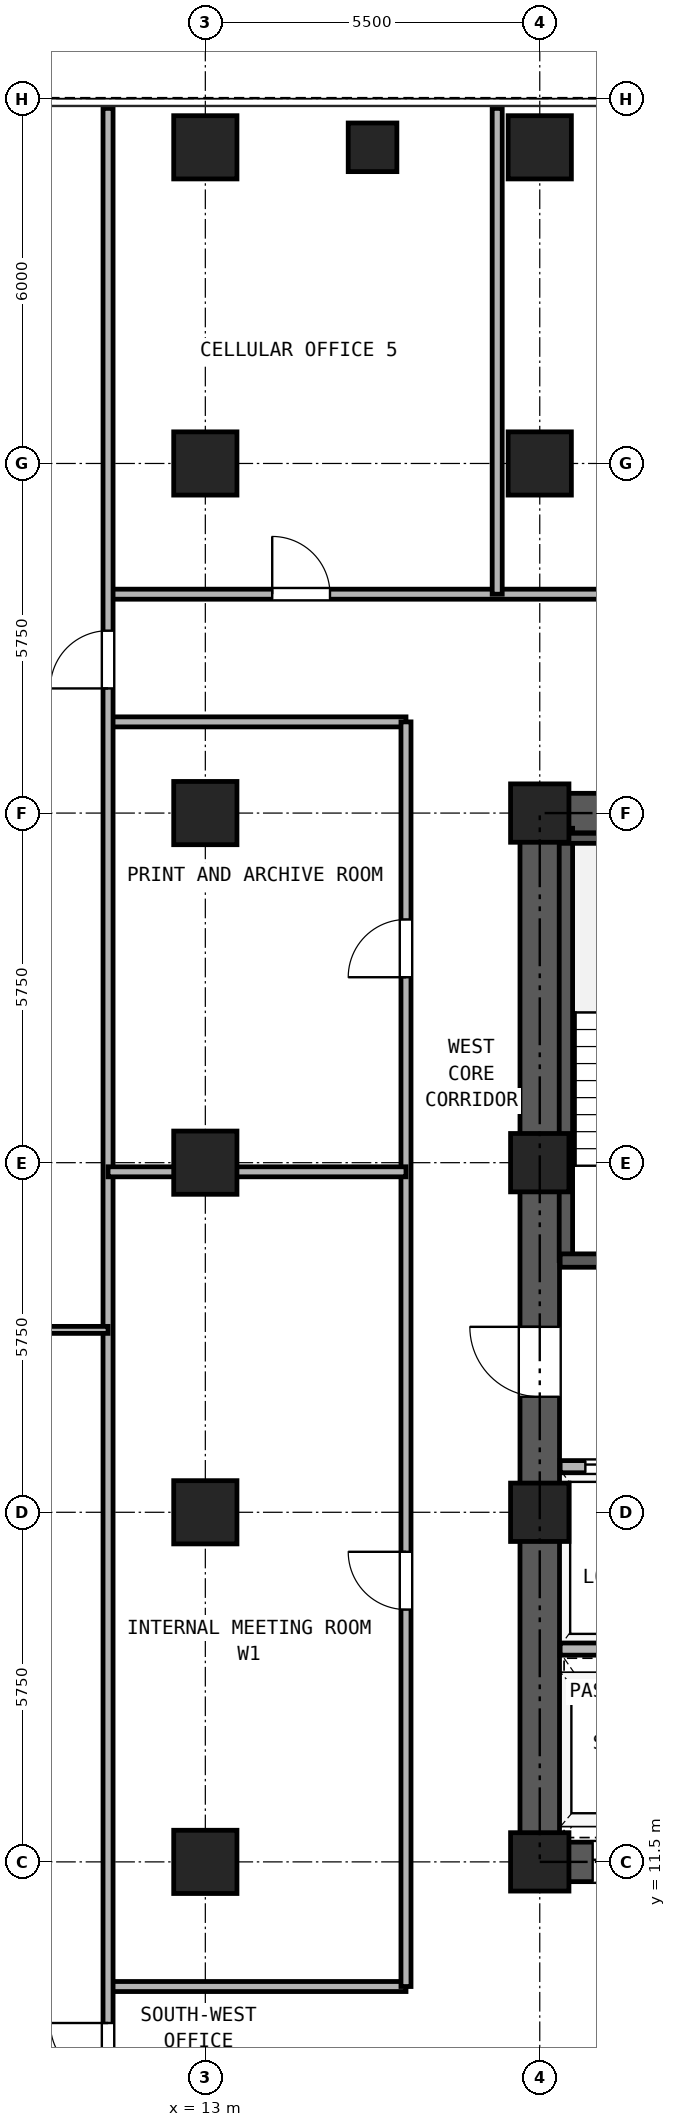
"""IFC4 building model, lengths in metres.
Left out: names, types, materials, properties, quantities, classifications, styles, units other than length and angle.
Written with IfcOpenShell. Run it as: python <this file> out.ifc"""

import sys

from ifc_helpers import new_model, si_unit, direction, frame, frame_2d, origin, origin_2d, place, context, subcontext, project, spatial, rectangle, hollow_rectangle, extrude, source, transform, mapped, element, fill, save


model = new_model("IFC4")
c1 = context("Model", 3, precision=1e-05, world=origin(), true_north=direction((0.0, 1.0)))
c2 = subcontext(c1, "Body", "Model", "MODEL_VIEW")
j1 = project(units=[si_unit("LENGTHUNIT", "METRE"), si_unit("PLANEANGLEUNIT", "RADIAN")], contexts=[c1])
p1 = place(None, origin())
s1 = spatial("IfcSite", under=j1, at=p1, CompositionType="ELEMENT")
p2 = place(p1, origin())
s2 = spatial("IfcBuilding", under=s1, at=p2, CompositionType="ELEMENT")
p3 = place(p2, frame((0.0, 0.0, 33.3)))
s3 = spatial("IfcBuildingStorey", under=s2, at=p3, CompositionType="ELEMENT", Elevation=33.3)
m1 = source(origin(), c2, "Body", "SweptSolid", [
    extrude(hollow_rectangle(XDim=1.04, YDim=1.04, WallThickness=0.065, at=origin_2d()), origin(), (0.0, 0.0, 1.0), 3.32),
])
for number, where, z_axis, x_axis in (
    (1, (13.0, 39.7, 0.0), (0.0, 0.0, 1.0), (1.0, 0.0, 0.0)),
    (2, (18.5, 39.7, 0.0), (0.0, 0.0, 1.0), (1.0, 0.0, 0.0)),
    (3, (13.0, 11.5, 0.0), (0.0, 0.0, 1.0), (1.0, 0.0, 0.0)),
    (4, (13.0, 17.25, 0.0), (0.0, 0.0, 1.0), (1.0, 0.0, 0.0)),
    (5, (13.0, 23.0, 0.0), (0.0, 0.0, 1.0), (1.0, 0.0, 0.0)),
    (6, (13.0, 28.75, 0.0), (0.0, 0.0, 1.0), (1.0, 0.0, 0.0)),
    (7, (13.0, 34.5, 0.0), (0.0, 0.0, 1.0), (1.0, 0.0, 0.0)),
):
    element("IfcColumn", number, at=place(p3, frame(where, z_axis=z_axis, x_axis=x_axis)), inside=s3, PredefinedType="COLUMN", context=c2, shape_type="MappedRepresentation", body=[
        mapped(m1, transform((0.0, 0.0, 0.0), x_axis=(1.0, 0.0, 0.0), y_axis=(0.0, 1.0, 0.0), z_axis=(0.0, 0.0, 1.0), scale=1.0)),
    ])
m2 = source(origin(), c2, "Body", "SweptSolid", [
    extrude(hollow_rectangle(XDim=0.96, YDim=0.96, WallThickness=0.06, at=origin_2d()), origin(), (0.0, 0.0, 1.0), 3.32),
])
for number, where, z_axis, x_axis in (
    (8, (18.5, 11.5, 0.0), (0.0, 0.0, 1.0), (1.0, 0.0, 0.0)),
    (9, (18.5, 17.25, 0.0), (0.0, 0.0, 1.0), (1.0, 0.0, 0.0)),
    (10, (18.5, 23.0, 0.0), (0.0, 0.0, 1.0), (1.0, 0.0, 0.0)),
    (11, (18.5, 28.75, 0.0), (0.0, 0.0, 1.0), (1.0, 0.0, 0.0)),
):
    element("IfcColumn", number, at=place(p3, frame(where, z_axis=z_axis, x_axis=x_axis)), inside=s3, PredefinedType="COLUMN", context=c2, shape_type="MappedRepresentation", body=[
        mapped(m2, transform((0.0, 0.0, 0.0), x_axis=(1.0, 0.0, 0.0), y_axis=(0.0, 1.0, 0.0), z_axis=(0.0, 0.0, 1.0), scale=1.0)),
    ])
p4 = place(p3, frame((18.5, 34.5, 0.0), z_axis=(0.0, 0.0, 1.0), x_axis=(1.0, 0.0, 0.0)))
e12 = element("IfcColumn", 12, at=p4, inside=s3, PredefinedType="COLUMN", context=c2, shape_type="MappedRepresentation", body=[
    mapped(m1, transform((0.0, 0.0, 0.0), x_axis=(1.0, 0.0, 0.0), y_axis=(0.0, 1.0, 0.0), z_axis=(0.0, 0.0, 1.0), scale=1.0)),
])
m3 = source(origin(), c2, "Body", "SweptSolid", [
    extrude(hollow_rectangle(XDim=0.8, YDim=0.8, WallThickness=0.045, at=origin_2d()), origin(), (0.0, 0.0, 1.0), 3.32),
])
p5 = place(p3, frame((15.75, 39.7, 0.0), z_axis=(0.0, 0.0, 1.0), x_axis=(1.0, 0.0, 0.0)))
e13 = element("IfcColumn", 13, at=p5, inside=s3, PredefinedType="COLUMN", context=c2, shape_type="MappedRepresentation", body=[
    mapped(m3, transform((0.0, 0.0, 0.0), x_axis=(1.0, 0.0, 0.0), y_axis=(0.0, 1.0, 0.0), z_axis=(0.0, 0.0, 1.0), scale=1.0)),
])
p6 = place(p3, frame((18.175, 11.5, 0.0), z_axis=(0.0, 0.0, 1.0), x_axis=(1.0, 0.0, 0.0)))
e14 = element("IfcWall", 14, at=p6, inside=s3, PredefinedType="SHEAR", context=c2, shape_type="SweptSolid", body=[
    extrude(rectangle(XDim=10.65, YDim=0.65, at=frame_2d((5.325, 0.0))), origin(), (0.0, 0.0, 1.0), 3.32),
])
p7 = place(p6, frame((1.195, 0.0, 0.0)))
e15 = element("IfcOpeningElement", 15, at=p7, cuts=e14, PredefinedType="OPENING", context=c2, shape_type="SweptSolid", body=[
    extrude(rectangle(XDim=1.1, YDim=2.25, at=frame_2d((0.55, 1.125))), frame((0.0, 0.335, 0.0), z_axis=(0.0, -1.0, 0.0), x_axis=(1.0, 0.0, 0.0)), (0.0, 0.0, 1.0), 0.67),
])
p8 = place(p6, frame((3.495, 0.0, 0.0)))
e16 = element("IfcOpeningElement", 16, at=p8, cuts=e14, PredefinedType="OPENING", context=c2, shape_type="SweptSolid", body=[
    extrude(rectangle(XDim=1.1, YDim=2.25, at=frame_2d((0.55, 1.125))), frame((0.0, 0.335, 0.0), z_axis=(0.0, -1.0, 0.0), x_axis=(1.0, 0.0, 0.0)), (0.0, 0.0, 1.0), 0.67),
])
p9 = place(p6, frame((5.925, 0.0, 0.0)))
e17 = element("IfcOpeningElement", 17, at=p9, cuts=e14, PredefinedType="OPENING", context=c2, shape_type="SweptSolid", body=[
    extrude(rectangle(XDim=1.1, YDim=2.25, at=frame_2d((0.55, 1.125))), frame((0.0, 0.335, 0.0), z_axis=(0.0, -1.0, 0.0), x_axis=(1.0, 0.0, 0.0)), (0.0, 0.0, 1.0), 0.67),
])
p10 = place(p6, frame((8.325, 0.0, 0.0)))
e18 = element("IfcOpeningElement", 18, at=p10, cuts=e14, PredefinedType="OPENING", context=c2, shape_type="SweptSolid", body=[
    extrude(rectangle(XDim=1.1, YDim=2.25, at=frame_2d((0.55, 1.125))), frame((0.0, 0.335, 0.0), z_axis=(0.0, -1.0, 0.0), x_axis=(1.0, 0.0, 0.0)), (0.0, 0.0, 1.0), 0.67),
])
p11 = place(p3, frame((18.175, 28.75, 0.0), z_axis=(0.0, 0.0, 1.0), x_axis=(1.0, 0.0, 0.0)))
e19 = element("IfcWall", 19, at=p11, inside=s3, PredefinedType="SHEAR", context=c2, shape_type="SweptSolid", body=[
    extrude(rectangle(XDim=10.65, YDim=0.65, at=frame_2d((5.325, 0.0))), origin(), (0.0, 0.0, 1.0), 3.32),
])
p12 = place(p11, frame((4.205, 0.0, 0.0)))
e20 = element("IfcOpeningElement", 20, at=p12, cuts=e19, PredefinedType="OPENING", context=c2, shape_type="SweptSolid", body=[
    extrude(rectangle(XDim=0.9, YDim=2.05, at=frame_2d((0.45, 1.025))), frame((0.0, 0.335, 0.0), z_axis=(0.0, -1.0, 0.0), x_axis=(1.0, 0.0, 0.0)), (0.0, 0.0, 1.0), 0.67),
])
p13 = place(p11, frame((5.745, 0.0, 0.0)))
e21 = element("IfcOpeningElement", 21, at=p13, cuts=e19, PredefinedType="OPENING", context=c2, shape_type="SweptSolid", body=[
    extrude(rectangle(XDim=0.9, YDim=2.05, at=frame_2d((0.45, 1.025))), frame((0.0, 0.335, 0.0), z_axis=(0.0, -1.0, 0.0), x_axis=(1.0, 0.0, 0.0)), (0.0, 0.0, 1.0), 0.67),
])
p14 = place(p3, frame((18.5, 11.825, 0.0), z_axis=(0.0, 0.0, 1.0), x_axis=(0.0, 1.0, 0.0)))
e22 = element("IfcWall", 22, at=p14, inside=s3, PredefinedType="SHEAR", context=c2, shape_type="SweptSolid", body=[
    extrude(rectangle(XDim=16.6, YDim=0.65, at=frame_2d((8.3, 0.0))), origin(), (0.0, 0.0, 1.0), 3.32),
])
p15 = place(p14, frame((7.325, 0.0, 0.0)))
e23 = element("IfcOpeningElement", 23, at=p15, cuts=e22, PredefinedType="OPENING", context=c2, shape_type="SweptSolid", body=[
    extrude(rectangle(XDim=1.15, YDim=2.2, at=frame_2d((0.575, 1.1))), frame((0.0, 0.335, 0.0), z_axis=(0.0, -1.0, 0.0), x_axis=(1.0, 0.0, 0.0)), (0.0, 0.0, 1.0), 0.67),
])
p16 = place(p3, frame((18.93, 21.39, 0.0), z_axis=(0.0, 0.0, 1.0), x_axis=(0.0, 1.0, 0.0)))
e24 = element("IfcWall", 24, at=p16, inside=s3, PredefinedType="SOLIDWALL", context=c2, shape_type="SweptSolid", body=[
    extrude(rectangle(XDim=7.11, YDim=0.22, at=frame_2d((3.555, 0.0))), origin(), (0.0, 0.0, 1.0), 3.32),
])
p17 = place(p3, frame((18.835, 28.335, 0.0), z_axis=(0.0, 0.0, 1.0), x_axis=(1.0, 0.0, 0.0)))
e25 = element("IfcWall", 25, at=p17, inside=s3, PredefinedType="PARTITIONING", context=c2, shape_type="SweptSolid", body=[
    extrude(rectangle(XDim=3.275, YDim=0.165, at=frame_2d((1.638, 0.0))), origin(), (0.0, 0.0, 1.0), 3.32),
])
p18 = place(p3, frame((18.835, 21.39, 0.0), z_axis=(0.0, 0.0, 1.0), x_axis=(1.0, 0.0, 0.0)))
e26 = element("IfcWall", 26, at=p18, inside=s3, PredefinedType="SOLIDWALL", context=c2, shape_type="SweptSolid", body=[
    extrude(rectangle(XDim=6.295, YDim=0.22, at=frame_2d((3.147, 0.0))), origin(), (0.0, 0.0, 1.0), 3.32),
])
p19 = place(p18, frame((1.015, 0.0, 0.0)))
e27 = element("IfcOpeningElement", 27, at=p19, cuts=e26, PredefinedType="OPENING", context=c2, shape_type="SweptSolid", body=[
    extrude(rectangle(XDim=1.15, YDim=2.2, at=frame_2d((0.575, 1.1))), frame((0.0, 0.12, 0.0), z_axis=(0.0, -1.0, 0.0), x_axis=(1.0, 0.0, 0.0)), (0.0, 0.0, 1.0), 0.24),
])
p20 = place(p18, frame((4.745, 0.0, 0.0)))
e28 = element("IfcOpeningElement", 28, at=p20, cuts=e26, PredefinedType="OPENING", context=c2, shape_type="SweptSolid", body=[
    extrude(rectangle(XDim=1.1, YDim=2.25, at=frame_2d((0.55, 1.125))), frame((0.0, 0.12, 0.0), z_axis=(0.0, -1.0, 0.0), x_axis=(1.0, 0.0, 0.0)), (0.0, 0.0, 1.0), 0.24),
])
p21 = place(p3, frame((18.835, 18.0, 0.0), z_axis=(0.0, 0.0, 1.0), x_axis=(1.0, 0.0, 0.0)))
e29 = element("IfcWall", 29, at=p21, inside=s3, PredefinedType="PARTITIONING", context=c2, shape_type="SweptSolid", body=[
    extrude(rectangle(XDim=9.33, YDim=0.2, at=frame_2d((4.665, 0.0))), origin(), (0.0, 0.0, 1.0), 3.32),
])
p22 = place(p21, frame((0.415, 0.0, 0.0)))
e30 = element("IfcOpeningElement", 30, at=p22, cuts=e29, PredefinedType="OPENING", context=c2, shape_type="SweptSolid", body=[
    extrude(rectangle(XDim=1.3, YDim=2.3, at=frame_2d((0.65, 1.15))), frame((0.0, 0.11, 0.0), z_axis=(0.0, -1.0, 0.0), x_axis=(1.0, 0.0, 0.0)), (0.0, 0.0, 1.0), 0.22),
])
p23 = place(p21, frame((2.515, 0.0, 0.0)))
e31 = element("IfcOpeningElement", 31, at=p23, cuts=e29, PredefinedType="OPENING", context=c2, shape_type="SweptSolid", body=[
    extrude(rectangle(XDim=1.3, YDim=2.3, at=frame_2d((0.65, 1.15))), frame((0.0, 0.11, 0.0), z_axis=(0.0, -1.0, 0.0), x_axis=(1.0, 0.0, 0.0)), (0.0, 0.0, 1.0), 0.22),
])
p24 = place(p21, frame((4.915, 0.0, 0.0)))
e32 = element("IfcOpeningElement", 32, at=p24, cuts=e29, PredefinedType="OPENING", context=c2, shape_type="SweptSolid", body=[
    extrude(rectangle(XDim=0.9, YDim=2.05, at=frame_2d((0.45, 1.025))), frame((0.0, 0.11, 0.0), z_axis=(0.0, -1.0, 0.0), x_axis=(1.0, 0.0, 0.0)), (0.0, 0.0, 1.0), 0.22),
])
p25 = place(p21, frame((7.615, 0.0, 0.0)))
e33 = element("IfcOpeningElement", 33, at=p25, cuts=e29, PredefinedType="OPENING", context=c2, shape_type="SweptSolid", body=[
    extrude(rectangle(XDim=0.9, YDim=2.05, at=frame_2d((0.45, 1.025))), frame((0.0, 0.11, 0.0), z_axis=(0.0, -1.0, 0.0), x_axis=(1.0, 0.0, 0.0)), (0.0, 0.0, 1.0), 0.22),
])
p26 = place(p3, frame((18.835, 15.0, 0.0), z_axis=(0.0, 0.0, 1.0), x_axis=(1.0, 0.0, 0.0)))
e34 = element("IfcWall", 34, at=p26, inside=s3, PredefinedType="PARTITIONING", context=c2, shape_type="SweptSolid", body=[
    extrude(rectangle(XDim=9.33, YDim=0.2, at=frame_2d((4.665, 0.0))), origin(), (0.0, 0.0, 1.0), 3.32),
])
p27 = place(p3, frame((11.4, 32.35, 0.0), z_axis=(0.0, 0.0, 1.0), x_axis=(1.0, 0.0, 0.0)))
e35 = element("IfcWall", 35, at=p27, inside=s3, PredefinedType="PARTITIONING", context=c2, shape_type="SweptSolid", body=[
    extrude(rectangle(XDim=24.2, YDim=0.165, at=frame_2d((12.1, 0.0))), origin(), (0.0, 0.0, 1.0), 3.32),
])
p28 = place(p27, frame((2.7, 0.0, 0.0)))
e36 = element("IfcOpeningElement", 36, at=p28, cuts=e35, PredefinedType="OPENING", context=c2, shape_type="SweptSolid", body=[
    extrude(rectangle(XDim=0.95, YDim=2.15, at=frame_2d((0.475, 1.075))), frame((0.0, 0.093, 0.0), z_axis=(0.0, -1.0, 0.0), x_axis=(1.0, 0.0, 0.0)), (0.0, 0.0, 1.0), 0.185),
])
p29 = place(p27, frame((9.2, 0.0, 0.0)))
e37 = element("IfcOpeningElement", 37, at=p29, cuts=e35, PredefinedType="OPENING", context=c2, shape_type="SweptSolid", body=[
    extrude(rectangle(XDim=0.95, YDim=2.15, at=frame_2d((0.475, 1.075))), frame((0.0, 0.093, 0.0), z_axis=(0.0, -1.0, 0.0), x_axis=(1.0, 0.0, 0.0)), (0.0, 0.0, 1.0), 0.185),
])
p30 = place(p27, frame((15.9, 0.0, 0.0)))
e38 = element("IfcOpeningElement", 38, at=p30, cuts=e35, PredefinedType="OPENING", context=c2, shape_type="SweptSolid", body=[
    extrude(rectangle(XDim=0.95, YDim=2.15, at=frame_2d((0.475, 1.075))), frame((0.0, 0.093, 0.0), z_axis=(0.0, -1.0, 0.0), x_axis=(1.0, 0.0, 0.0)), (0.0, 0.0, 1.0), 0.185),
])
p31 = place(p27, frame((21.5, 0.0, 0.0)))
e39 = element("IfcOpeningElement", 39, at=p31, cuts=e35, PredefinedType="OPENING", context=c2, shape_type="SweptSolid", body=[
    extrude(rectangle(XDim=0.95, YDim=2.15, at=frame_2d((0.475, 1.075))), frame((0.0, 0.093, 0.0), z_axis=(0.0, -1.0, 0.0), x_axis=(1.0, 0.0, 0.0)), (0.0, 0.0, 1.0), 0.185),
])
for number, where, z_axis, x_axis in (
    (40, (11.4, 9.45, 0.0), (0.0, 0.0, 1.0), (1.0, 0.0, 0.0)),
    (41, (11.4, 30.25, 0.0), (0.0, 0.0, 1.0), (1.0, 0.0, 0.0)),
):
    element("IfcWall", number, at=place(p3, frame(where, z_axis=z_axis, x_axis=x_axis)), inside=s3, PredefinedType="PARTITIONING", context=c2, shape_type="SweptSolid", body=[
        extrude(rectangle(XDim=4.9, YDim=0.165, at=frame_2d((2.45, 0.0))), origin(), (0.0, 0.0, 1.0), 3.32),
    ])
p32 = place(p3, frame((16.3, 9.45, 0.0), z_axis=(0.0, 0.0, 1.0), x_axis=(0.0, 1.0, 0.0)))
e42 = element("IfcWall", 42, at=p32, inside=s3, PredefinedType="PARTITIONING", context=c2, shape_type="SweptSolid", body=[
    extrude(rectangle(XDim=20.8, YDim=0.165, at=frame_2d((10.4, 0.0))), origin(), (0.0, 0.0, 1.0), 3.32),
])
p33 = place(p32, frame((6.2, 0.0, 0.0)))
e43 = element("IfcOpeningElement", 43, at=p33, cuts=e42, PredefinedType="OPENING", context=c2, shape_type="SweptSolid", body=[
    extrude(rectangle(XDim=0.95, YDim=2.15, at=frame_2d((0.475, 1.075))), frame((0.0, 0.093, 0.0), z_axis=(0.0, -1.0, 0.0), x_axis=(1.0, 0.0, 0.0)), (0.0, 0.0, 1.0), 0.185),
])
p34 = place(p32, frame((16.6, 0.0, 0.0)))
e44 = element("IfcOpeningElement", 44, at=p34, cuts=e42, PredefinedType="OPENING", context=c2, shape_type="SweptSolid", body=[
    extrude(rectangle(XDim=0.95, YDim=2.15, at=frame_2d((0.475, 1.075))), frame((0.0, 0.093, 0.0), z_axis=(0.0, -1.0, 0.0), x_axis=(1.0, 0.0, 0.0)), (0.0, 0.0, 1.0), 0.185),
])
p35 = place(p3, frame((11.4, 0.16, 0.0), z_axis=(0.0, 0.0, 1.0), x_axis=(0.0, 1.0, 0.0)))
e45 = element("IfcWall", 45, at=p35, inside=s3, PredefinedType="PARTITIONING", context=c2, shape_type="SweptSolid", body=[
    extrude(rectangle(XDim=40.18, YDim=0.165, at=frame_2d((20.09, 0.0))), origin(), (0.0, 0.0, 1.0), 3.32),
])
p36 = place(p35, frame((7.74, 0.0, 0.0)))
e46 = element("IfcOpeningElement", 46, at=p36, cuts=e45, PredefinedType="OPENING", context=c2, shape_type="SweptSolid", body=[
    extrude(rectangle(XDim=0.95, YDim=2.15, at=frame_2d((0.475, 1.075))), frame((0.0, 0.093, 0.0), z_axis=(0.0, -1.0, 0.0), x_axis=(1.0, 0.0, 0.0)), (0.0, 0.0, 1.0), 0.185),
])
p37 = place(p35, frame((30.64, 0.0, 0.0)))
e47 = element("IfcOpeningElement", 47, at=p37, cuts=e45, PredefinedType="OPENING", context=c2, shape_type="SweptSolid", body=[
    extrude(rectangle(XDim=0.95, YDim=2.15, at=frame_2d((0.475, 1.075))), frame((0.0, 0.093, 0.0), z_axis=(0.0, -1.0, 0.0), x_axis=(1.0, 0.0, 0.0)), (0.0, 0.0, 1.0), 0.185),
])
p38 = place(p3, frame((17.8, 32.35, 0.0), z_axis=(0.0, 0.0, 1.0), x_axis=(0.0, 1.0, 0.0)))
e48 = element("IfcWall", 48, at=p38, inside=s3, PredefinedType="PARTITIONING", context=c2, shape_type="SweptSolid", body=[
    extrude(rectangle(XDim=7.99, YDim=0.165, at=frame_2d((3.995, 0.0))), origin(), (0.0, 0.0, 1.0), 3.32),
])
p39 = place(p3, frame((0.16, 20.25, 0.0), z_axis=(0.0, 0.0, 1.0), x_axis=(1.0, 0.0, 0.0)))
e49 = element("IfcWall", 49, at=p39, inside=s3, PredefinedType="PARTITIONING", context=c2, shape_type="SweptSolid", body=[
    extrude(rectangle(XDim=11.24, YDim=0.115, at=frame_2d((5.62, 0.0))), origin(), (0.0, 0.0, 1.0), 2.898),
])
p40 = place(p3, frame((11.4, 22.85, 0.0), z_axis=(0.0, 0.0, 1.0), x_axis=(1.0, 0.0, 0.0)))
e50 = element("IfcWall", 50, at=p40, inside=s3, PredefinedType="PARTITIONING", context=c2, shape_type="SweptSolid", body=[
    extrude(rectangle(XDim=4.9, YDim=0.165, at=frame_2d((2.45, 0.0))), origin(), (0.0, 0.0, 1.0), 2.539),
])
p41 = place(p22, origin())
e51 = element("IfcDoor", 51, at=p41, inside=s3, OperationType="DOUBLE_DOOR_SLIDING", PredefinedType="DOOR", context=c2, shape_type="SweptSolid", body=[
    extrude(rectangle(XDim=1.3, YDim=2.3, at=frame_2d((0.65, 1.15))), frame((0.0, 0.025, 0.0), z_axis=(0.0, -1.0, 0.0), x_axis=(1.0, 0.0, 0.0)), (0.0, 0.0, 1.0), 0.05),
])
fill(e30, e51)
p42 = place(p15, frame((1.15, 0.0, 0.0), z_axis=(0.0, 0.0, 1.0), x_axis=(-1.0, 0.0, 0.0)))
e52 = element("IfcDoor", 52, at=p42, inside=s3, OperationType="SINGLE_SWING_RIGHT", PredefinedType="DOOR", context=c2, shape_type="SweptSolid", body=[
    extrude(rectangle(XDim=1.15, YDim=2.2, at=frame_2d((0.575, 1.1))), frame((0.0, 0.025, 0.0), z_axis=(0.0, -1.0, 0.0), x_axis=(1.0, 0.0, 0.0)), (0.0, 0.0, 1.0), 0.05),
])
fill(e23, e52)
p43 = place(p7, frame((1.1, 0.0, 0.0), z_axis=(0.0, 0.0, 1.0), x_axis=(-1.0, 0.0, 0.0)))
e53 = element("IfcDoor", 53, at=p43, inside=s3, OperationType="DOUBLE_DOOR_SLIDING", PredefinedType="DOOR", context=c2, shape_type="SweptSolid", body=[
    extrude(rectangle(XDim=1.1, YDim=2.25, at=frame_2d((0.55, 1.125))), frame((0.0, 0.025, 0.0), z_axis=(0.0, -1.0, 0.0), x_axis=(1.0, 0.0, 0.0)), (0.0, 0.0, 1.0), 0.05),
])
fill(e15, e53)
p44 = place(p28, origin())
e54 = element("IfcDoor", 54, at=p44, inside=s3, OperationType="SINGLE_SWING_LEFT", PredefinedType="DOOR", context=c2, shape_type="SweptSolid", body=[
    extrude(rectangle(XDim=0.95, YDim=2.15, at=frame_2d((0.475, 1.075))), frame((0.0, 0.025, 0.0), z_axis=(0.0, -1.0, 0.0), x_axis=(1.0, 0.0, 0.0)), (0.0, 0.0, 1.0), 0.05),
])
fill(e36, e54)
p45 = place(p36, frame((0.95, 0.0, 0.0), z_axis=(0.0, 0.0, 1.0), x_axis=(-1.0, 0.0, 0.0)))
e55 = element("IfcDoor", 55, at=p45, inside=s3, OperationType="SINGLE_SWING_RIGHT", PredefinedType="DOOR", context=c2, shape_type="SweptSolid", body=[
    extrude(rectangle(XDim=0.95, YDim=2.15, at=frame_2d((0.475, 1.075))), frame((0.0, 0.025, 0.0), z_axis=(0.0, -1.0, 0.0), x_axis=(1.0, 0.0, 0.0)), (0.0, 0.0, 1.0), 0.05),
])
fill(e46, e55)
p46 = place(p37, frame((0.95, 0.0, 0.0), z_axis=(0.0, 0.0, 1.0), x_axis=(-1.0, 0.0, 0.0)))
e56 = element("IfcDoor", 56, at=p46, inside=s3, OperationType="SINGLE_SWING_LEFT", PredefinedType="DOOR", context=c2, shape_type="SweptSolid", body=[
    extrude(rectangle(XDim=0.95, YDim=2.15, at=frame_2d((0.475, 1.075))), frame((0.0, 0.025, 0.0), z_axis=(0.0, -1.0, 0.0), x_axis=(1.0, 0.0, 0.0)), (0.0, 0.0, 1.0), 0.05),
])
fill(e47, e56)
p47 = place(p33, frame((0.95, 0.0, 0.0), z_axis=(0.0, 0.0, 1.0), x_axis=(-1.0, 0.0, 0.0)))
e57 = element("IfcDoor", 57, at=p47, inside=s3, OperationType="SINGLE_SWING_RIGHT", PredefinedType="DOOR", context=c2, shape_type="SweptSolid", body=[
    extrude(rectangle(XDim=0.95, YDim=2.15, at=frame_2d((0.475, 1.075))), frame((0.0, 0.025, 0.0), z_axis=(0.0, -1.0, 0.0), x_axis=(1.0, 0.0, 0.0)), (0.0, 0.0, 1.0), 0.05),
])
fill(e43, e57)
p48 = place(p34, frame((0.95, 0.0, 0.0), z_axis=(0.0, 0.0, 1.0), x_axis=(-1.0, 0.0, 0.0)))
e58 = element("IfcDoor", 58, at=p48, inside=s3, OperationType="SINGLE_SWING_LEFT", PredefinedType="DOOR", context=c2, shape_type="SweptSolid", body=[
    extrude(rectangle(XDim=0.95, YDim=2.15, at=frame_2d((0.475, 1.075))), frame((0.0, 0.025, 0.0), z_axis=(0.0, -1.0, 0.0), x_axis=(1.0, 0.0, 0.0)), (0.0, 0.0, 1.0), 0.05),
])
fill(e44, e58)
save(model, sys.argv[1])
